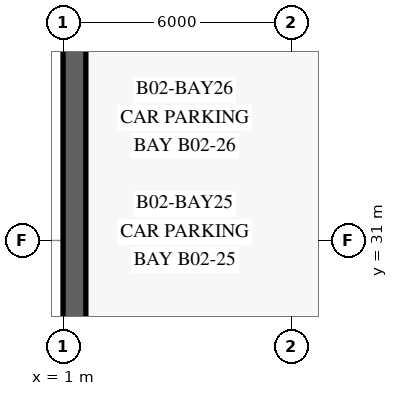
"""IFC4 building model, lengths in metres.
Left out: names, types, materials, properties, quantities, classifications, styles, units other than length and angle.
Written with IfcOpenShell. Run it as: python <this file> out.ifc"""

import sys

from ifc_helpers import new_model, si_unit, direction, frame, frame_2d, origin, origin_2d, place, context, subcontext, project, spatial, rectangle, i_section, extrude, element, save


model = new_model("IFC4")
c1 = context("Model", 3, precision=1e-05, world=origin(), true_north=direction((0.0, 1.0)))
c2 = subcontext(c1, "Body", "Model", "MODEL_VIEW")
j1 = project(units=[si_unit("LENGTHUNIT", "METRE"), si_unit("PLANEANGLEUNIT", "RADIAN")], contexts=[c1])
p1 = place(None, origin())
s1 = spatial("IfcSite", under=j1, at=p1, CompositionType="ELEMENT")
p2 = place(p1, origin())
s2 = spatial("IfcBuilding", under=s1, at=p2, CompositionType="ELEMENT")
p3 = place(p2, frame((0.0, 0.0, -8.4)))
s3 = spatial("IfcBuildingStorey", under=s2, at=p3, CompositionType="ELEMENT", Elevation=-8.4)
p4 = place(p3, frame((1.3, 48.4, 0.0), z_axis=(0.0, 0.0, 1.0), x_axis=(0.0, -1.0, 0.0)))
e1 = element("IfcWall", 1, at=p4, inside=s3, PredefinedType="USERDEFINED", context=c2, shape_type="SweptSolid", body=[
    extrude(rectangle(XDim=46.8, YDim=0.6, at=frame_2d((23.4, 0.0))), origin(), (0.0, 0.0, 1.0), 3.88),
])
p5 = place(p3, frame((6.8, 28.7, 0.0), z_axis=(0.0, 0.0, 1.0), x_axis=(1.0, 0.0, 0.0)))
e2 = element("IfcColumn", 2, at=p5, inside=s3, PredefinedType="COLUMN", context=c2, shape_type="SweptSolid", body=[
    extrude(i_section(OverallWidth=0.303, OverallDepth=0.814, WebThickness=0.021, FlangeThickness=0.04, at=origin_2d()), origin(), (0.0, 0.0, 1.0), 4.2),
])
save(model, sys.argv[1])
